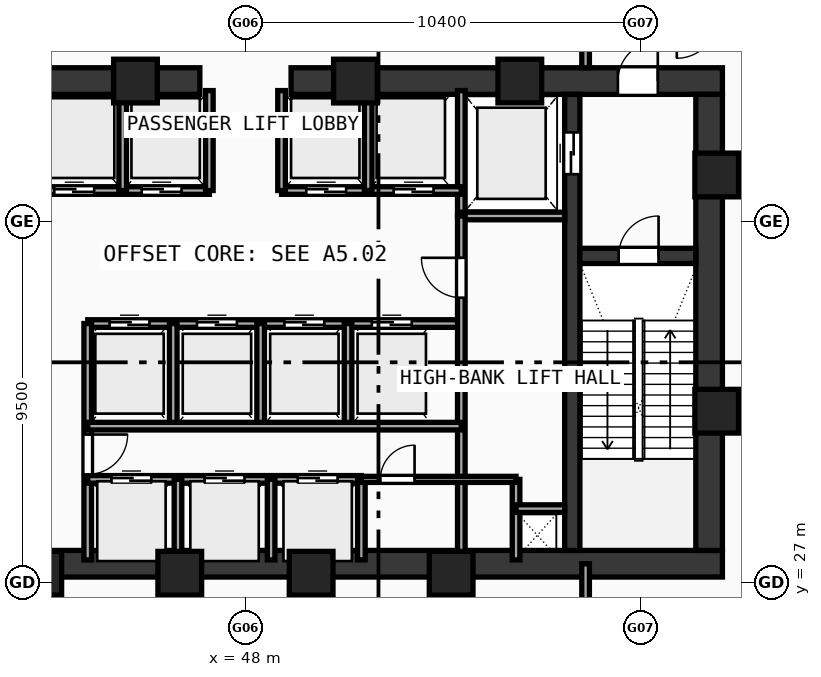
"""IFC4 building model, lengths in metres.
Left out: names, types, materials, properties, quantities, classifications, styles, units other than length and angle.
Written with IfcOpenShell. Run it as: python <this file> out.ifc"""

import sys

from ifc_helpers import new_model, si_unit, direction, frame, frame_2d, origin, origin_with_axes, origin_2d, place, context, subcontext, project, spatial, rectangle, hollow_rectangle, extrude, source, transform, mapped, element, fill, save


model = new_model("IFC4")
c1 = context("Model", 3, precision=1e-05, world=origin(), true_north=direction((0.0, 1.0)))
c2 = subcontext(c1, "Body", "Model", "MODEL_VIEW")
j1 = project(units=[si_unit("LENGTHUNIT", "METRE"), si_unit("PLANEANGLEUNIT", "RADIAN")], contexts=[c1])
p1 = place(None, origin())
s1 = spatial("IfcSite", under=j1, at=p1, CompositionType="ELEMENT")
p2 = place(p1, origin())
s2 = spatial("IfcBuilding", under=s1, at=p2, CompositionType="ELEMENT")
p3 = place(p2, origin())
s3 = spatial("IfcBuildingStorey", under=s2, at=p3, CompositionType="ELEMENT", Elevation=0.0)
p4 = place(p3, frame((35.45, 27.5, 0.0), z_axis=(0.0, 0.0, 1.0), x_axis=(1.0, 0.0, 0.0)))
e1 = element("IfcWall", 1, at=p4, inside=s3, PredefinedType="SHEAR", context=c2, shape_type="SweptSolid", body=[
    extrude(rectangle(XDim=25.1, YDim=0.7, at=frame_2d((12.55, 0.0))), origin(), (0.0, 0.0, 1.0), 4.52),
])
p5 = place(p3, frame((35.45, 40.2, 0.0), z_axis=(0.0, 0.0, 1.0), x_axis=(1.0, 0.0, 0.0)))
e2 = element("IfcWall", 2, at=p5, inside=s3, PredefinedType="SHEAR", context=c2, shape_type="SweptSolid", body=[
    extrude(rectangle(XDim=11.35, YDim=0.7, at=frame_2d((5.675, 0.0))), origin(), (0.0, 0.0, 1.0), 4.52),
])
p6 = place(p5, frame((1.7, 0.0, 0.0)))
e3 = element("IfcOpeningElement", 3, at=p6, cuts=e2, PredefinedType="OPENING", context=c2, shape_type="SweptSolid", body=[
    extrude(rectangle(XDim=1.05, YDim=2.1, at=frame_2d((0.525, 1.05))), frame((0.0, 0.36, 0.0), z_axis=(0.0, -1.0, 0.0), x_axis=(1.0, 0.0, 0.0)), (0.0, 0.0, 1.0), 0.72),
])
p7 = place(p3, frame((49.2, 40.2, 0.0), z_axis=(0.0, 0.0, 1.0), x_axis=(1.0, 0.0, 0.0)))
e4 = element("IfcWall", 4, at=p7, inside=s3, PredefinedType="SHEAR", context=c2, shape_type="SweptSolid", body=[
    extrude(rectangle(XDim=11.35, YDim=0.7, at=frame_2d((5.675, 0.0))), origin(), (0.0, 0.0, 1.0), 4.52),
])
p8 = place(p7, frame((8.6, 0.0, 0.0)))
e5 = element("IfcOpeningElement", 5, at=p8, cuts=e4, PredefinedType="OPENING", context=c2, shape_type="SweptSolid", body=[
    extrude(rectangle(XDim=1.05, YDim=2.1, at=frame_2d((0.525, 1.05))), frame((0.0, 0.36, 0.0), z_axis=(0.0, -1.0, 0.0), x_axis=(1.0, 0.0, 0.0)), (0.0, 0.0, 1.0), 0.72),
])
p9 = place(p3, frame((60.2, 27.85, 0.0), z_axis=(0.0, 0.0, 1.0), x_axis=(0.0, 1.0, 0.0)))
e6 = element("IfcWall", 6, at=p9, inside=s3, PredefinedType="SHEAR", context=c2, shape_type="SweptSolid", body=[
    extrude(rectangle(XDim=12.0, YDim=0.7, at=frame_2d((6.0, 0.0))), origin(), (0.0, 0.0, 1.0), 4.52),
])
p10 = place(p3, frame((56.6, 27.85, 0.0), z_axis=(0.0, 0.0, 1.0), x_axis=(0.0, 1.0, 0.0)))
e7 = element("IfcWall", 7, at=p10, inside=s3, PredefinedType="SHEAR", context=c2, shape_type="SweptSolid", body=[
    extrude(rectangle(XDim=12.0, YDim=0.4, at=frame_2d((6.0, 0.0))), origin(), (0.0, 0.0, 1.0), 4.52),
])
p11 = place(p10, frame((9.9, 0.0, 0.0)))
e8 = element("IfcOpeningElement", 8, at=p11, cuts=e7, PredefinedType="OPENING", context=c2, shape_type="SweptSolid", body=[
    extrude(rectangle(XDim=1.1, YDim=2.1, at=frame_2d((0.55, 1.05))), frame((0.0, 0.21, 0.0), z_axis=(0.0, -1.0, 0.0), x_axis=(1.0, 0.0, 0.0)), (0.0, 0.0, 1.0), 0.42),
])
p12 = place(p3, frame((56.8, 35.6, 0.0), z_axis=(0.0, 0.0, 1.0), x_axis=(1.0, 0.0, 0.0)))
e9 = element("IfcWall", 9, at=p12, inside=s3, PredefinedType="SHEAR", context=c2, shape_type="SweptSolid", body=[
    extrude(rectangle(XDim=3.05, YDim=0.4, at=frame_2d((1.525, 0.0))), origin(), (0.0, 0.0, 1.0), 4.52),
])
p13 = place(p12, frame((1.02, 0.0, 0.0)))
e10 = element("IfcOpeningElement", 10, at=p13, cuts=e9, PredefinedType="OPENING", context=c2, shape_type="SweptSolid", body=[
    extrude(rectangle(XDim=1.05, YDim=2.1, at=frame_2d((0.525, 1.05))), frame((0.0, 0.21, 0.0), z_axis=(0.0, -1.0, 0.0), x_axis=(1.0, 0.0, 0.0)), (0.0, 0.0, 1.0), 0.42),
])
m1 = source(origin(), c2, "Body", "SweptSolid", [
    extrude(hollow_rectangle(XDim=1.15, YDim=1.15, WallThickness=0.048, at=origin_2d()), origin(), (0.0, 0.0, 1.0), 4.8),
])
for number, where, z_axis, x_axis in (
    (11, (42.588, 27.25, -0.28), (0.0, 0.0, 1.0), (1.0, 0.0, 0.0)),
    (12, (46.272, 27.25, -0.28), (0.0, 0.0, 1.0), (1.0, 0.0, 0.0)),
    (13, (49.729, 27.25, -0.28), (0.0, 0.0, 1.0), (1.0, 0.0, 0.0)),
    (14, (53.412, 27.25, -0.28), (0.0, 0.0, 1.0), (1.0, 0.0, 0.0)),
    (15, (60.4, 31.513, -0.28), (0.0, 0.0, 1.0), (1.0, 0.0, 0.0)),
    (16, (60.4, 37.729, -0.28), (0.0, 0.0, 1.0), (1.0, 0.0, 0.0)),
    (17, (55.219, 40.2, -0.28), (0.0, 0.0, 1.0), (1.0, 0.0, 0.0)),
    (18, (50.894, 40.2, -0.28), (0.0, 0.0, 1.0), (1.0, 0.0, 0.0)),
    (19, (45.106, 40.2, -0.28), (0.0, 0.0, 1.0), (1.0, 0.0, 0.0)),
):
    element("IfcColumn", number, at=place(p3, frame(where, z_axis=z_axis, x_axis=x_axis)), inside=s3, PredefinedType="COLUMN", context=c2, shape_type="MappedRepresentation", body=[
        mapped(m1, transform((0.0, 0.0, 0.0), scale=1.0)),
    ])
p14 = place(p3, frame((53.68, 36.65, 0.0), z_axis=(0.0, 0.0, 1.0), x_axis=(0.0, 1.0, 0.0)))
e20 = element("IfcWall", 20, at=p14, inside=s3, PredefinedType="SOLIDWALL", context=c2, shape_type="SweptSolid", body=[
    extrude(rectangle(XDim=3.3, YDim=0.2, at=frame_2d((1.65, 0.0))), origin(), (0.0, 0.0, 1.0), 4.52),
])
p15 = place(p3, frame((53.68, 36.65, 0.0), z_axis=(0.0, 0.0, 1.0), x_axis=(1.0, 0.0, 0.0)))
e21 = element("IfcWall", 21, at=p15, inside=s3, PredefinedType="SOLIDWALL", context=c2, shape_type="SweptSolid", body=[
    extrude(rectangle(XDim=2.72, YDim=0.2, at=frame_2d((1.36, 0.0))), origin(), (0.0, 0.0, 1.0), 4.52),
])
p16 = place(p3, frame((42.32, 37.32, 0.0), z_axis=(0.0, 0.0, 1.0), x_axis=(1.0, 0.0, 0.0)))
e22 = element("IfcWall", 22, at=p16, inside=s3, PredefinedType="SOLIDWALL", context=c2, shape_type="SweptSolid", body=[
    extrude(rectangle(XDim=4.73, YDim=0.2, at=frame_2d((2.365, 0.0))), origin(), (0.0, 0.0, 1.0), 4.52),
])
p17 = place(p16, frame((0.65, 0.0, 0.0)))
e23 = element("IfcOpeningElement", 23, at=p17, cuts=e22, PredefinedType="OPENING", context=c2, shape_type="SweptSolid", body=[
    extrude(rectangle(XDim=1.05, YDim=2.1, at=frame_2d((0.525, 1.05))), frame((0.0, 0.11, 0.0), z_axis=(0.0, -1.0, 0.0), x_axis=(1.0, 0.0, 0.0)), (0.0, 0.0, 1.0), 0.22),
])
p18 = place(p16, frame((2.95, 0.0, 0.0)))
e24 = element("IfcOpeningElement", 24, at=p18, cuts=e22, PredefinedType="OPENING", context=c2, shape_type="SweptSolid", body=[
    extrude(rectangle(XDim=1.05, YDim=2.1, at=frame_2d((0.525, 1.05))), frame((0.0, 0.11, 0.0), z_axis=(0.0, -1.0, 0.0), x_axis=(1.0, 0.0, 0.0)), (0.0, 0.0, 1.0), 0.22),
])
p19 = place(p3, frame((48.95, 37.32, 0.0), z_axis=(0.0, 0.0, 1.0), x_axis=(1.0, 0.0, 0.0)))
e25 = element("IfcWall", 25, at=p19, inside=s3, PredefinedType="SOLIDWALL", context=c2, shape_type="SweptSolid", body=[
    extrude(rectangle(XDim=4.73, YDim=0.2, at=frame_2d((2.365, 0.0))), origin(), (0.0, 0.0, 1.0), 4.52),
])
p20 = place(p19, frame((0.65, 0.0, 0.0)))
e26 = element("IfcOpeningElement", 26, at=p20, cuts=e25, PredefinedType="OPENING", context=c2, shape_type="SweptSolid", body=[
    extrude(rectangle(XDim=1.05, YDim=2.1, at=frame_2d((0.525, 1.05))), frame((0.0, 0.11, 0.0), z_axis=(0.0, -1.0, 0.0), x_axis=(1.0, 0.0, 0.0)), (0.0, 0.0, 1.0), 0.22),
])
p21 = place(p19, frame((2.95, 0.0, 0.0)))
e27 = element("IfcOpeningElement", 27, at=p21, cuts=e25, PredefinedType="OPENING", context=c2, shape_type="SweptSolid", body=[
    extrude(rectangle(XDim=1.05, YDim=2.1, at=frame_2d((0.525, 1.05))), frame((0.0, 0.11, 0.0), z_axis=(0.0, -1.0, 0.0), x_axis=(1.0, 0.0, 0.0)), (0.0, 0.0, 1.0), 0.22),
])
for number, where, z_axis, x_axis in (
    (28, (47.05, 37.32, 0.0), (0.0, 0.0, 1.0), (0.0, 1.0, 0.0)),
    (29, (48.95, 37.32, 0.0), (0.0, 0.0, 1.0), (0.0, 1.0, 0.0)),
    (30, (44.77, 37.32, 0.0), (0.0, 0.0, 1.0), (0.0, 1.0, 0.0)),
    (31, (51.23, 37.32, 0.0), (0.0, 0.0, 1.0), (0.0, 1.0, 0.0)),
):
    element("IfcWall", number, at=place(p3, frame(where, z_axis=z_axis, x_axis=x_axis)), inside=s3, PredefinedType="SOLIDWALL", context=c2, shape_type="SweptSolid", body=[
        extrude(rectangle(XDim=2.63, YDim=0.2, at=frame_2d((1.315, 0.0))), origin(), (0.0, 0.0, 1.0), 4.52),
    ])
p22 = place(p3, frame((43.85, 33.82, 0.0), z_axis=(0.0, 0.0, 1.0), x_axis=(1.0, 0.0, 0.0)))
e32 = element("IfcWall", 32, at=p22, inside=s3, PredefinedType="SOLIDWALL", context=c2, shape_type="SweptSolid", body=[
    extrude(rectangle(XDim=9.83, YDim=0.2, at=frame_2d((4.915, 0.0))), origin(), (0.0, 0.0, 1.0), 4.52),
])
p23 = place(p22, frame((0.575, 0.0, 0.0)))
e33 = element("IfcOpeningElement", 33, at=p23, cuts=e32, PredefinedType="OPENING", context=c2, shape_type="SweptSolid", body=[
    extrude(rectangle(XDim=1.05, YDim=2.1, at=frame_2d((0.525, 1.05))), frame((0.0, 0.11, 0.0), z_axis=(0.0, -1.0, 0.0), x_axis=(1.0, 0.0, 0.0)), (0.0, 0.0, 1.0), 0.22),
])
p24 = place(p22, frame((2.875, 0.0, 0.0)))
e34 = element("IfcOpeningElement", 34, at=p24, cuts=e32, PredefinedType="OPENING", context=c2, shape_type="SweptSolid", body=[
    extrude(rectangle(XDim=1.05, YDim=2.1, at=frame_2d((0.525, 1.05))), frame((0.0, 0.11, 0.0), z_axis=(0.0, -1.0, 0.0), x_axis=(1.0, 0.0, 0.0)), (0.0, 0.0, 1.0), 0.22),
])
p25 = place(p22, frame((5.175, 0.0, 0.0)))
e35 = element("IfcOpeningElement", 35, at=p25, cuts=e32, PredefinedType="OPENING", context=c2, shape_type="SweptSolid", body=[
    extrude(rectangle(XDim=1.05, YDim=2.1, at=frame_2d((0.525, 1.05))), frame((0.0, 0.11, 0.0), z_axis=(0.0, -1.0, 0.0), x_axis=(1.0, 0.0, 0.0)), (0.0, 0.0, 1.0), 0.22),
])
p26 = place(p22, frame((7.475, 0.0, 0.0)))
e36 = element("IfcOpeningElement", 36, at=p26, cuts=e32, PredefinedType="OPENING", context=c2, shape_type="SweptSolid", body=[
    extrude(rectangle(XDim=1.05, YDim=2.1, at=frame_2d((0.525, 1.05))), frame((0.0, 0.11, 0.0), z_axis=(0.0, -1.0, 0.0), x_axis=(1.0, 0.0, 0.0)), (0.0, 0.0, 1.0), 0.22),
])
p27 = place(p3, frame((43.85, 27.6, 0.0), z_axis=(0.0, 0.0, 1.0), x_axis=(0.0, 1.0, 0.0)))
e37 = element("IfcWall", 37, at=p27, inside=s3, PredefinedType="SOLIDWALL", context=c2, shape_type="SweptSolid", body=[
    extrude(rectangle(XDim=6.22, YDim=0.2, at=frame_2d((3.11, 0.0))), origin(), (0.0, 0.0, 1.0), 4.52),
])
p28 = place(p27, frame((2.25, 0.0, 0.0)))
e38 = element("IfcOpeningElement", 38, at=p28, cuts=e37, PredefinedType="OPENING", context=c2, shape_type="SweptSolid", body=[
    extrude(rectangle(XDim=1.05, YDim=2.1, at=frame_2d((0.525, 1.05))), frame((0.0, 0.11, 0.0), z_axis=(0.0, -1.0, 0.0), x_axis=(1.0, 0.0, 0.0)), (0.0, 0.0, 1.0), 0.22),
])
p29 = place(p3, frame((53.68, 27.6, 0.0), z_axis=(0.0, 0.0, 1.0), x_axis=(0.0, 1.0, 0.0)))
e39 = element("IfcWall", 39, at=p29, inside=s3, PredefinedType="SOLIDWALL", context=c2, shape_type="SweptSolid", body=[
    extrude(rectangle(XDim=9.05, YDim=0.2, at=frame_2d((4.525, 0.0))), origin(), (0.0, 0.0, 1.0), 4.52),
])
p30 = place(p29, frame((6.9, 0.0, 0.0)))
e40 = element("IfcOpeningElement", 40, at=p30, cuts=e39, PredefinedType="OPENING", context=c2, shape_type="SweptSolid", body=[
    extrude(rectangle(XDim=1.05, YDim=2.1, at=frame_2d((0.525, 1.05))), frame((0.0, 0.11, 0.0), z_axis=(0.0, -1.0, 0.0), x_axis=(1.0, 0.0, 0.0)), (0.0, 0.0, 1.0), 0.22),
])
for number, where, z_axis, x_axis in (
    (41, (46.1, 31.12, 0.0), (0.0, 0.0, 1.0), (0.0, 1.0, 0.0)),
    (42, (48.4, 31.12, 0.0), (0.0, 0.0, 1.0), (0.0, 1.0, 0.0)),
    (43, (50.7, 31.12, 0.0), (0.0, 0.0, 1.0), (0.0, 1.0, 0.0)),
):
    element("IfcWall", number, at=place(p3, frame(where, z_axis=z_axis, x_axis=x_axis)), inside=s3, PredefinedType="SOLIDWALL", context=c2, shape_type="SweptSolid", body=[
        extrude(rectangle(XDim=2.7, YDim=0.2, at=frame_2d((1.35, 0.0))), origin(), (0.0, 0.0, 1.0), 4.52),
    ])
p31 = place(p3, frame((43.85, 29.72, 0.0), z_axis=(0.0, 0.0, 1.0), x_axis=(1.0, 0.0, 0.0)))
e44 = element("IfcWall", 44, at=p31, inside=s3, PredefinedType="SOLIDWALL", context=c2, shape_type="SweptSolid", body=[
    extrude(rectangle(XDim=7.2, YDim=0.2, at=frame_2d((3.6, 0.0))), origin(), (0.0, 0.0, 1.0), 4.52),
])
p32 = place(p31, frame((0.625, 0.0, 0.0)))
e45 = element("IfcOpeningElement", 45, at=p32, cuts=e44, PredefinedType="OPENING", context=c2, shape_type="SweptSolid", body=[
    extrude(rectangle(XDim=1.05, YDim=2.1, at=frame_2d((0.525, 1.05))), frame((0.0, 0.11, 0.0), z_axis=(0.0, -1.0, 0.0), x_axis=(1.0, 0.0, 0.0)), (0.0, 0.0, 1.0), 0.22),
])
p33 = place(p31, frame((3.075, 0.0, 0.0)))
e46 = element("IfcOpeningElement", 46, at=p33, cuts=e44, PredefinedType="OPENING", context=c2, shape_type="SweptSolid", body=[
    extrude(rectangle(XDim=1.05, YDim=2.1, at=frame_2d((0.525, 1.05))), frame((0.0, 0.11, 0.0), z_axis=(0.0, -1.0, 0.0), x_axis=(1.0, 0.0, 0.0)), (0.0, 0.0, 1.0), 0.22),
])
p34 = place(p31, frame((5.525, 0.0, 0.0)))
e47 = element("IfcOpeningElement", 47, at=p34, cuts=e44, PredefinedType="OPENING", context=c2, shape_type="SweptSolid", body=[
    extrude(rectangle(XDim=1.05, YDim=2.1, at=frame_2d((0.525, 1.05))), frame((0.0, 0.11, 0.0), z_axis=(0.0, -1.0, 0.0), x_axis=(1.0, 0.0, 0.0)), (0.0, 0.0, 1.0), 0.22),
])
p35 = place(p3, frame((51.05, 27.6, 0.0), z_axis=(0.0, 0.0, 1.0), x_axis=(0.0, 1.0, 0.0)))
e48 = element("IfcWall", 48, at=p35, inside=s3, PredefinedType="SOLIDWALL", context=c2, shape_type="SweptSolid", body=[
    extrude(rectangle(XDim=2.12, YDim=0.2, at=frame_2d((1.06, 0.0))), origin(), (0.0, 0.0, 1.0), 4.52),
])
p36 = place(p3, frame((43.85, 31.12, 0.0), z_axis=(0.0, 0.0, 1.0), x_axis=(1.0, 0.0, 0.0)))
e49 = element("IfcWall", 49, at=p36, inside=s3, PredefinedType="SOLIDWALL", context=c2, shape_type="SweptSolid", body=[
    extrude(rectangle(XDim=9.83, YDim=0.2, at=frame_2d((4.915, 0.0))), origin(), (0.0, 0.0, 1.0), 4.52),
])
for number, where, z_axis, x_axis in (
    (50, (46.225, 27.6, 0.0), (0.0, 0.0, 1.0), (0.0, 1.0, 0.0)),
    (51, (48.675, 27.6, 0.0), (0.0, 0.0, 1.0), (0.0, 1.0, 0.0)),
    (52, (55.12, 27.6, 0.0), (0.0, 0.0, 1.0), (0.0, 1.0, 0.0)),
):
    element("IfcWall", number, at=place(p3, frame(where, z_axis=z_axis, x_axis=x_axis)), inside=s3, PredefinedType="SOLIDWALL", context=c2, shape_type="SweptSolid", body=[
        extrude(rectangle(XDim=2.12, YDim=0.2, at=frame_2d((1.06, 0.0))), origin(), (0.0, 0.0, 1.0), 4.52),
    ])
p37 = place(p3, frame((55.12, 28.95, 0.0), z_axis=(0.0, 0.0, 1.0), x_axis=(1.0, 0.0, 0.0)))
e53 = element("IfcWall", 53, at=p37, inside=s3, PredefinedType="SOLIDWALL", context=c2, shape_type="SweptSolid", body=[
    extrude(rectangle(XDim=1.28, YDim=0.2, at=frame_2d((0.64, 0.0))), origin(), (0.0, 0.0, 1.0), 4.52),
])
p38 = place(p3, frame((51.05, 29.72, 0.0), z_axis=(0.0, 0.0, 1.0), x_axis=(1.0, 0.0, 0.0)))
e54 = element("IfcWall", 54, at=p38, inside=s3, PredefinedType="PARTITIONING", context=c2, shape_type="SweptSolid", body=[
    extrude(rectangle(XDim=4.07, YDim=0.16, at=frame_2d((2.035, 0.0))), origin(), (0.0, 0.0, 1.0), 4.52),
])
p39 = place(p38, frame((0.5, 0.0, 0.0)))
e55 = element("IfcOpeningElement", 55, at=p39, cuts=e54, PredefinedType="OPENING", context=c2, shape_type="SweptSolid", body=[
    extrude(rectangle(XDim=0.9, YDim=2.1, at=frame_2d((0.45, 1.05))), frame((0.0, 0.09, 0.0), z_axis=(0.0, -1.0, 0.0), x_axis=(1.0, 0.0, 0.0)), (0.0, 0.0, 1.0), 0.18),
])
p40 = place(p3, frame((56.95, 40.55, 0.0), z_axis=(0.0, 0.0, 1.0), x_axis=(0.0, 1.0, 0.0)))
e56 = element("IfcWall", 56, at=p40, inside=s3, PredefinedType="SOLIDWALL", context=c2, shape_type="SweptSolid", body=[
    extrude(rectangle(XDim=1.2, YDim=0.2, at=frame_2d((0.6, 0.0))), origin(), (0.0, 0.0, 1.0), 4.52),
])
p41 = place(p3, frame((56.95, 6.15, 0.0), z_axis=(0.0, 0.0, 1.0), x_axis=(0.0, 1.0, 0.0)))
e57 = element("IfcWall", 57, at=p41, inside=s3, PredefinedType="SOLIDWALL", context=c2, shape_type="SweptSolid", body=[
    extrude(rectangle(XDim=21.35, YDim=0.2, at=frame_2d((10.675, 0.0))), origin(), (0.0, 0.0, 1.0), 3.62),
])
p42 = place(p41, frame((11.5, 0.0, 0.0)))
e58 = element("IfcOpeningElement", 58, at=p42, cuts=e57, PredefinedType="OPENING", context=c2, shape_type="SweptSolid", body=[
    extrude(rectangle(XDim=1.05, YDim=2.1, at=frame_2d((0.525, 1.05))), frame((0.0, 0.11, 0.0), z_axis=(0.0, -1.0, 0.0), x_axis=(1.0, 0.0, 0.0)), (0.0, 0.0, 1.0), 0.22),
])
m2 = source(origin(), c2, "Body", "SweptSolid", [
    extrude(rectangle(XDim=1.05, YDim=2.1, at=frame_2d((0.525, 1.05))), frame((0.0, 0.025, 0.0), z_axis=(0.0, -1.0, 0.0), x_axis=(1.0, 0.0, 0.0)), (0.0, 0.0, 1.0), 0.05),
])
p43 = place(p13, origin_with_axes())
e59 = element("IfcDoor", 59, at=p43, inside=s3, OperationType="SINGLE_SWING_RIGHT", PredefinedType="DOOR", context=c2, shape_type="MappedRepresentation", body=[
    mapped(m2, transform((0.0, 0.0, 0.0), scale=1.0)),
])
fill(e10, e59)
p44 = place(p8, origin_with_axes())
e60 = element("IfcDoor", 60, at=p44, inside=s3, OperationType="SINGLE_SWING_RIGHT", PredefinedType="DOOR", context=c2, shape_type="MappedRepresentation", body=[
    mapped(m2, transform((0.0, 0.0, 0.0), scale=1.0)),
])
fill(e5, e60)
m3 = source(origin(), c2, "Body", "SweptSolid", [
    extrude(rectangle(XDim=1.1, YDim=2.1, at=frame_2d((0.55, 1.05))), frame((0.0, 0.025, 0.0), z_axis=(0.0, -1.0, 0.0), x_axis=(1.0, 0.0, 0.0)), (0.0, 0.0, 1.0), 0.05),
])
p45 = place(p11, origin_with_axes())
e61 = element("IfcDoor", 61, at=p45, inside=s3, OperationType="DOUBLE_DOOR_SLIDING", PredefinedType="DOOR", context=c2, shape_type="MappedRepresentation", body=[
    mapped(m3, transform((0.0, 0.0, 0.0), scale=1.0)),
])
fill(e8, e61)
p46 = place(p17, frame((1.05, 0.0, 0.0), z_axis=(0.0, 0.0, 1.0), x_axis=(-1.0, 0.0, 0.0)))
e62 = element("IfcDoor", 62, at=p46, inside=s3, OperationType="DOUBLE_DOOR_SLIDING", PredefinedType="DOOR", context=c2, shape_type="MappedRepresentation", body=[
    mapped(m2, transform((0.0, 0.0, 0.0), scale=1.0)),
])
fill(e23, e62)
p47 = place(p18, frame((1.05, 0.0, 0.0), z_axis=(0.0, 0.0, 1.0), x_axis=(-1.0, 0.0, 0.0)))
e63 = element("IfcDoor", 63, at=p47, inside=s3, OperationType="DOUBLE_DOOR_SLIDING", PredefinedType="DOOR", context=c2, shape_type="MappedRepresentation", body=[
    mapped(m2, transform((0.0, 0.0, 0.0), scale=1.0)),
])
fill(e24, e63)
p48 = place(p20, frame((1.05, 0.0, 0.0), z_axis=(0.0, 0.0, 1.0), x_axis=(-1.0, 0.0, 0.0)))
e64 = element("IfcDoor", 64, at=p48, inside=s3, OperationType="DOUBLE_DOOR_SLIDING", PredefinedType="DOOR", context=c2, shape_type="MappedRepresentation", body=[
    mapped(m2, transform((0.0, 0.0, 0.0), scale=1.0)),
])
fill(e26, e64)
p49 = place(p21, frame((1.05, 0.0, 0.0), z_axis=(0.0, 0.0, 1.0), x_axis=(-1.0, 0.0, 0.0)))
e65 = element("IfcDoor", 65, at=p49, inside=s3, OperationType="DOUBLE_DOOR_SLIDING", PredefinedType="DOOR", context=c2, shape_type="MappedRepresentation", body=[
    mapped(m2, transform((0.0, 0.0, 0.0), scale=1.0)),
])
fill(e27, e65)
p50 = place(p23, origin_with_axes())
e66 = element("IfcDoor", 66, at=p50, inside=s3, OperationType="DOUBLE_DOOR_SLIDING", PredefinedType="DOOR", context=c2, shape_type="MappedRepresentation", body=[
    mapped(m2, transform((0.0, 0.0, 0.0), scale=1.0)),
])
fill(e33, e66)
p51 = place(p24, origin_with_axes())
e67 = element("IfcDoor", 67, at=p51, inside=s3, OperationType="DOUBLE_DOOR_SLIDING", PredefinedType="DOOR", context=c2, shape_type="MappedRepresentation", body=[
    mapped(m2, transform((0.0, 0.0, 0.0), scale=1.0)),
])
fill(e34, e67)
p52 = place(p25, origin_with_axes())
e68 = element("IfcDoor", 68, at=p52, inside=s3, OperationType="DOUBLE_DOOR_SLIDING", PredefinedType="DOOR", context=c2, shape_type="MappedRepresentation", body=[
    mapped(m2, transform((0.0, 0.0, 0.0), scale=1.0)),
])
fill(e35, e68)
p53 = place(p26, origin_with_axes())
e69 = element("IfcDoor", 69, at=p53, inside=s3, OperationType="DOUBLE_DOOR_SLIDING", PredefinedType="DOOR", context=c2, shape_type="MappedRepresentation", body=[
    mapped(m2, transform((0.0, 0.0, 0.0), scale=1.0)),
])
fill(e36, e69)
p54 = place(p28, frame((1.05, 0.0, 0.0), z_axis=(0.0, 0.0, 1.0), x_axis=(-1.0, 0.0, 0.0)))
e70 = element("IfcDoor", 70, at=p54, inside=s3, OperationType="SINGLE_SWING_LEFT", PredefinedType="DOOR", context=c2, shape_type="MappedRepresentation", body=[
    mapped(m2, transform((0.0, 0.0, 0.0), scale=1.0)),
])
fill(e38, e70)
p55 = place(p30, origin_with_axes())
e71 = element("IfcDoor", 71, at=p55, inside=s3, OperationType="SINGLE_SWING_RIGHT", PredefinedType="DOOR", context=c2, shape_type="MappedRepresentation", body=[
    mapped(m2, transform((0.0, 0.0, 0.0), scale=1.0)),
])
fill(e40, e71)
p56 = place(p32, origin_with_axes())
e72 = element("IfcDoor", 72, at=p56, inside=s3, OperationType="DOUBLE_DOOR_SLIDING", PredefinedType="DOOR", context=c2, shape_type="MappedRepresentation", body=[
    mapped(m2, transform((0.0, 0.0, 0.0), scale=1.0)),
])
fill(e45, e72)
p57 = place(p33, origin_with_axes())
e73 = element("IfcDoor", 73, at=p57, inside=s3, OperationType="DOUBLE_DOOR_SLIDING", PredefinedType="DOOR", context=c2, shape_type="MappedRepresentation", body=[
    mapped(m2, transform((0.0, 0.0, 0.0), scale=1.0)),
])
fill(e46, e73)
p58 = place(p34, origin_with_axes())
e74 = element("IfcDoor", 74, at=p58, inside=s3, OperationType="DOUBLE_DOOR_SLIDING", PredefinedType="DOOR", context=c2, shape_type="MappedRepresentation", body=[
    mapped(m2, transform((0.0, 0.0, 0.0), scale=1.0)),
])
fill(e47, e74)
m4 = source(origin(), c2, "Body", "SweptSolid", [
    extrude(rectangle(XDim=0.9, YDim=2.1, at=frame_2d((0.45, 1.05))), frame((0.0, 0.025, 0.0), z_axis=(0.0, -1.0, 0.0), x_axis=(1.0, 0.0, 0.0)), (0.0, 0.0, 1.0), 0.05),
])
p59 = place(p39, origin_with_axes())
e75 = element("IfcDoor", 75, at=p59, inside=s3, OperationType="SINGLE_SWING_RIGHT", PredefinedType="DOOR", context=c2, shape_type="MappedRepresentation", body=[
    mapped(m4, transform((0.0, 0.0, 0.0), scale=1.0)),
])
fill(e55, e75)
save(model, sys.argv[1])
